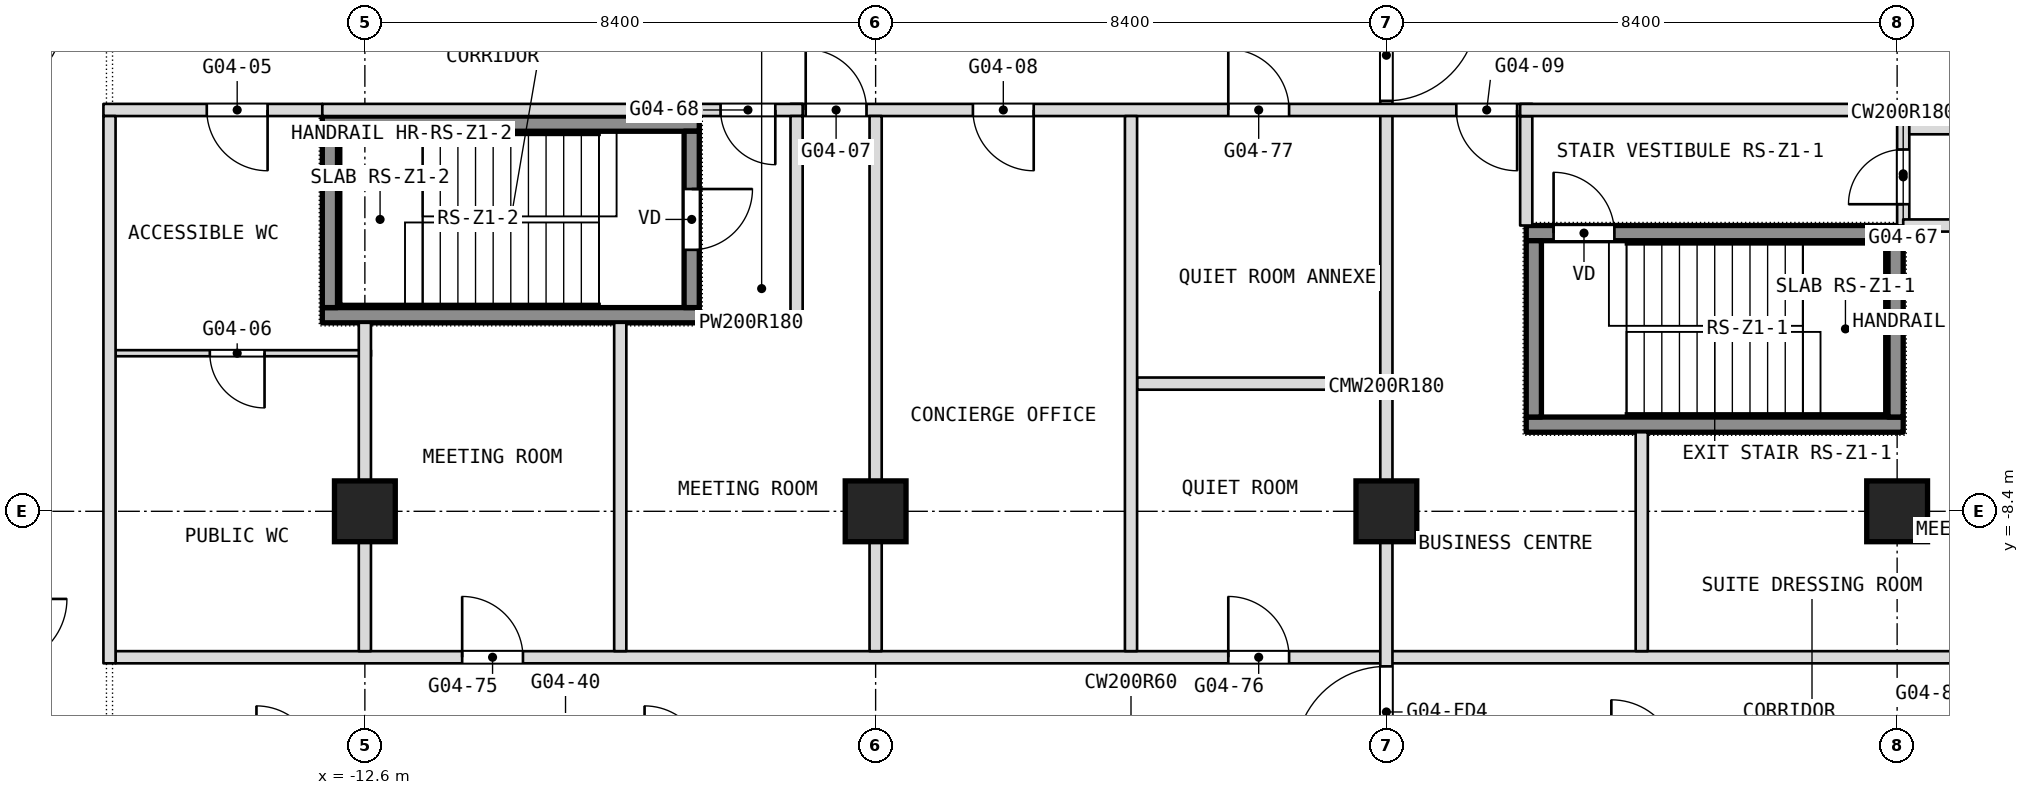
"""IFC4 building model, lengths in metres.
Left out: names, types, materials, properties, quantities, classifications, styles, units other than length and angle.
Written with IfcOpenShell. Run it as: python <this file> out.ifc"""

import sys

from ifc_helpers import new_model, si_unit, direction, frame, frame_2d, origin, origin_2d, place, context, subcontext, project, spatial, rectangle, extrude, element, fill, save


model = new_model("IFC4")
c1 = context("Model", 3, precision=1e-05, world=origin(), true_north=direction((0.0, 1.0)))
c2 = subcontext(c1, "Body", "Model", "MODEL_VIEW")
j1 = project(units=[si_unit("LENGTHUNIT", "METRE"), si_unit("PLANEANGLEUNIT", "RADIAN")], contexts=[c1])
p1 = place(None, origin())
s1 = spatial("IfcSite", under=j1, at=p1, CompositionType="ELEMENT")
p2 = place(p1, origin())
s2 = spatial("IfcBuilding", under=s1, at=p2, CompositionType="ELEMENT")
p3 = place(p2, frame((0.0, 0.0, 54.5)))
s3 = spatial("IfcBuildingStorey", under=s2, at=p3, CompositionType="ELEMENT", Elevation=54.5)
for number, where, z_axis, x_axis in (
    (1, (-12.6, -8.4, 0.0), (0.0, 0.0, 1.0), (1.0, 0.0, 0.0)),
    (2, (-4.2, -8.4, 0.0), (0.0, 0.0, 1.0), (1.0, 0.0, 0.0)),
    (3, (4.2, -8.4, 0.0), (0.0, 0.0, 1.0), (1.0, 0.0, 0.0)),
    (4, (12.6, -8.4, 0.0), (0.0, 0.0, 1.0), (1.0, 0.0, 0.0)),
):
    element("IfcColumn", number, at=place(p3, frame(where, z_axis=z_axis, x_axis=x_axis)), inside=s3, PredefinedType="COLUMN", context=c2, shape_type="SweptSolid", body=[
        extrude(rectangle(XDim=1.0, YDim=1.0, at=origin_2d()), origin(), (0.0, 0.0, 1.0), 3.6),
    ])
p4 = place(p3, frame((12.7, -3.7, 0.0), z_axis=(0.0, 0.0, 1.0), x_axis=(0.0, 1.0, 0.0)))
e5 = element("IfcWall", 5, at=p4, inside=s3, PredefinedType="PARTITIONING", context=c2, shape_type="SweptSolid", body=[
    extrude(rectangle(XDim=1.7, YDim=0.2, at=frame_2d((0.85, 0.0))), origin(), (0.0, 0.0, 1.0), 3.34),
])
p5 = place(p4, frame((0.35, 0.0, 0.0)))
e6 = element("IfcOpeningElement", 6, at=p5, cuts=e5, PredefinedType="OPENING", context=c2, shape_type="SweptSolid", body=[
    extrude(rectangle(XDim=0.9, YDim=2.1, at=frame_2d((0.45, 1.05))), frame((0.0, 0.1, 0.0), z_axis=(0.0, -1.0, 0.0), x_axis=(1.0, 0.0, 0.0)), (0.0, 0.0, 1.0), 0.2),
])
p6 = place(p3, frame((-16.7, -10.8, 0.0), z_axis=(0.0, 0.0, 1.0), x_axis=(1.0, 0.0, 0.0)))
e7 = element("IfcWall", 7, at=p6, inside=s3, PredefinedType="PARTITIONING", context=c2, shape_type="SweptSolid", body=[
    extrude(rectangle(XDim=33.4, YDim=0.2, at=frame_2d((16.7, 0.0))), origin(), (0.0, 0.0, 1.0), 3.34),
])
p7 = place(p6, frame((5.7, 0.0, 0.0)))
e8 = element("IfcOpeningElement", 8, at=p7, cuts=e7, PredefinedType="OPENING", context=c2, shape_type="SweptSolid", body=[
    extrude(rectangle(XDim=1.0, YDim=2.1, at=frame_2d((0.5, 1.05))), frame((0.0, 0.1, 0.0), z_axis=(0.0, -1.0, 0.0), x_axis=(1.0, 0.0, 0.0)), (0.0, 0.0, 1.0), 0.2),
])
p8 = place(p6, frame((18.3, 0.0, 0.0)))
e9 = element("IfcOpeningElement", 9, at=p8, cuts=e7, PredefinedType="OPENING", context=c2, shape_type="SweptSolid", body=[
    extrude(rectangle(XDim=1.0, YDim=2.1, at=frame_2d((0.5, 1.05))), frame((0.0, 0.1, 0.0), z_axis=(0.0, -1.0, 0.0), x_axis=(1.0, 0.0, 0.0)), (0.0, 0.0, 1.0), 0.2),
])
p9 = place(p3, frame((8.4, -10.7, 0.0), z_axis=(0.0, 0.0, 1.0), x_axis=(0.0, 1.0, 0.0)))
e10 = element("IfcWall", 10, at=p9, inside=s3, PredefinedType="PARTITIONING", context=c2, shape_type="SweptSolid", body=[
    extrude(rectangle(XDim=3.6, YDim=0.2, at=frame_2d((1.8, 0.0))), origin(), (0.0, 0.0, 1.0), 3.34),
])
p10 = place(p3, frame((6.5, -3.7, 0.0), z_axis=(0.0, 0.0, 1.0), x_axis=(0.0, 1.0, 0.0)))
e11 = element("IfcWall", 11, at=p10, inside=s3, PredefinedType="PARTITIONING", context=c2, shape_type="SweptSolid", body=[
    extrude(rectangle(XDim=1.8, YDim=0.2, at=frame_2d((0.9, 0.0))), origin(), (0.0, 0.0, 1.0), 3.34),
])
p11 = place(p3, frame((0.1, -6.3, 0.0), z_axis=(0.0, 0.0, 1.0), x_axis=(1.0, 0.0, 0.0)))
e12 = element("IfcWall", 12, at=p11, inside=s3, PredefinedType="PARTITIONING", context=c2, shape_type="SweptSolid", body=[
    extrude(rectangle(XDim=4.0, YDim=0.2, at=frame_2d((2.0, 0.0))), origin(), (0.0, 0.0, 1.0), 3.34),
])
p12 = place(p3, frame((-16.7, -5.8, 0.0), z_axis=(0.0, 0.0, 1.0), x_axis=(1.0, 0.0, 0.0)))
e13 = element("IfcWall", 13, at=p12, inside=s3, PredefinedType="PARTITIONING", context=c2, shape_type="SweptSolid", body=[
    extrude(rectangle(XDim=4.2, YDim=0.1, at=frame_2d((2.1, 0.0))), origin(), (0.0, 0.0, 1.0), 3.34),
])
p13 = place(p12, frame((1.55, 0.0, 0.0)))
e14 = element("IfcOpeningElement", 14, at=p13, cuts=e13, PredefinedType="OPENING", context=c2, shape_type="SweptSolid", body=[
    extrude(rectangle(XDim=0.9, YDim=2.1, at=frame_2d((0.45, 1.05))), frame((0.0, 0.05, 0.0), z_axis=(0.0, -1.0, 0.0), x_axis=(1.0, 0.0, 0.0)), (0.0, 0.0, 1.0), 0.1),
])
p14 = place(p3, frame((-7.1, -5.3, 0.0), z_axis=(0.0, 0.0, 1.0), x_axis=(1.0, 0.0, 0.0)))
e15 = element("IfcWall", 15, at=p14, inside=s3, PredefinedType="PARTITIONING", context=c2, shape_type="SweptSolid", body=[
    extrude(rectangle(XDim=1.7, YDim=0.2, at=frame_2d((0.85, 0.0))), origin(), (0.0, 0.0, 1.0), 3.34),
])
p15 = place(p3, frame((4.2, -12.7, 0.0), z_axis=(0.0, 0.0, 1.0), x_axis=(0.0, 1.0, 0.0)))
e16 = element("IfcWall", 16, at=p15, inside=s3, PredefinedType="PARTITIONING", context=c2, shape_type="SweptSolid", body=[
    extrude(rectangle(XDim=12.7, YDim=0.2, at=frame_2d((6.35, 0.0))), origin(), (0.0, 0.0, 1.0), 3.34),
])
p16 = place(p15, frame((11.05, 0.0, 0.0)))
e17 = element("IfcOpeningElement", 17, at=p16, cuts=e16, PredefinedType="OPENING", context=c2, shape_type="SweptSolid", body=[
    extrude(rectangle(XDim=1.5, YDim=2.1, at=frame_2d((0.75, 1.05))), frame((0.0, 0.1, 0.0), z_axis=(0.0, -1.0, 0.0), x_axis=(1.0, 0.0, 0.0)), (0.0, 0.0, 1.0), 0.2),
])
p17 = place(p15, frame((0.25, 0.0, 0.0)))
e18 = element("IfcOpeningElement", 18, at=p17, cuts=e16, PredefinedType="OPENING", context=c2, shape_type="SweptSolid", body=[
    extrude(rectangle(XDim=1.5, YDim=2.1, at=frame_2d((0.75, 1.05))), frame((0.0, 0.1, 0.0), z_axis=(0.0, -1.0, 0.0), x_axis=(1.0, 0.0, 0.0)), (0.0, 0.0, 1.0), 0.2),
])
p18 = place(p3, frame((12.7, -3.7, 0.0), z_axis=(0.0, 0.0, 1.0), x_axis=(1.0, 0.0, 0.0)))
e19 = element("IfcWall", 19, at=p18, inside=s3, PredefinedType="PARTITIONING", context=c2, shape_type="SweptSolid", body=[
    extrude(rectangle(XDim=4.0, YDim=0.2, at=frame_2d((2.0, 0.0))), origin(), (0.0, 0.0, 1.0), 3.34),
])
p19 = place(p3, frame((12.8, -2.1, 0.0), z_axis=(0.0, 0.0, 1.0), x_axis=(1.0, 0.0, 0.0)))
e20 = element("IfcWall", 20, at=p19, inside=s3, PredefinedType="PARTITIONING", context=c2, shape_type="SweptSolid", body=[
    extrude(rectangle(XDim=4.1, YDim=0.2, at=frame_2d((2.05, 0.0))), origin(), (0.0, 0.0, 1.0), 3.34),
])
p20 = place(p3, frame((-16.9, -1.8, 0.0), z_axis=(0.0, 0.0, 1.0), x_axis=(1.0, 0.0, 0.0)))
e21 = element("IfcWall", 21, at=p20, inside=s3, PredefinedType="PARTITIONING", context=c2, shape_type="SweptSolid", body=[
    extrude(rectangle(XDim=3.6, YDim=0.2, at=frame_2d((1.8, 0.0))), origin(), (0.0, 0.0, 1.0), 3.34),
])
p21 = place(p20, frame((1.7, 0.0, 0.0)))
e22 = element("IfcOpeningElement", 22, at=p21, cuts=e21, PredefinedType="OPENING", context=c2, shape_type="SweptSolid", body=[
    extrude(rectangle(XDim=1.0, YDim=2.1, at=frame_2d((0.5, 1.05))), frame((0.0, 0.1, 0.0), z_axis=(0.0, -1.0, 0.0), x_axis=(1.0, 0.0, 0.0)), (0.0, 0.0, 1.0), 0.2),
])
p22 = place(p3, frame((-5.6, -1.8, 0.0), z_axis=(0.0, 0.0, 1.0), x_axis=(1.0, 0.0, 0.0)))
e23 = element("IfcWall", 23, at=p22, inside=s3, PredefinedType="PARTITIONING", context=c2, shape_type="SweptSolid", body=[
    extrude(rectangle(XDim=12.2, YDim=0.2, at=frame_2d((6.1, 0.0))), origin(), (0.0, 0.0, 1.0), 3.34),
])
p23 = place(p22, frame((0.25, 0.0, 0.0)))
e24 = element("IfcOpeningElement", 24, at=p23, cuts=e23, PredefinedType="OPENING", context=c2, shape_type="SweptSolid", body=[
    extrude(rectangle(XDim=1.0, YDim=2.1, at=frame_2d((0.5, 1.05))), frame((0.0, 0.1, 0.0), z_axis=(0.0, -1.0, 0.0), x_axis=(1.0, 0.0, 0.0)), (0.0, 0.0, 1.0), 0.2),
])
p24 = place(p22, frame((3.0, 0.0, 0.0)))
e25 = element("IfcOpeningElement", 25, at=p24, cuts=e23, PredefinedType="OPENING", context=c2, shape_type="SweptSolid", body=[
    extrude(rectangle(XDim=1.0, YDim=2.1, at=frame_2d((0.5, 1.05))), frame((0.0, 0.1, 0.0), z_axis=(0.0, -1.0, 0.0), x_axis=(1.0, 0.0, 0.0)), (0.0, 0.0, 1.0), 0.2),
])
p25 = place(p22, frame((10.95, 0.0, 0.0)))
e26 = element("IfcOpeningElement", 26, at=p25, cuts=e23, PredefinedType="OPENING", context=c2, shape_type="SweptSolid", body=[
    extrude(rectangle(XDim=1.0, YDim=2.1, at=frame_2d((0.5, 1.05))), frame((0.0, 0.1, 0.0), z_axis=(0.0, -1.0, 0.0), x_axis=(1.0, 0.0, 0.0)), (0.0, 0.0, 1.0), 0.2),
])
p26 = place(p22, frame((7.2, 0.0, 0.0)))
e27 = element("IfcOpeningElement", 27, at=p26, cuts=e23, PredefinedType="OPENING", context=c2, shape_type="SweptSolid", body=[
    extrude(rectangle(XDim=1.0, YDim=2.1, at=frame_2d((0.5, 1.05))), frame((0.0, 0.1, 0.0), z_axis=(0.0, -1.0, 0.0), x_axis=(1.0, 0.0, 0.0)), (0.0, 0.0, 1.0), 0.2),
])
p27 = place(p3, frame((-13.3, -1.8, 0.0), z_axis=(0.0, 0.0, 1.0), x_axis=(1.0, 0.0, 0.0)))
e28 = element("IfcWall", 28, at=p27, inside=s3, PredefinedType="PARTITIONING", context=c2, shape_type="SweptSolid", body=[
    extrude(rectangle(XDim=7.9, YDim=0.2, at=frame_2d((3.95, 0.0))), origin(), (0.0, 0.0, 1.0), 3.34),
])
p28 = place(p27, frame((6.55, 0.0, 0.0)))
e29 = element("IfcOpeningElement", 29, at=p28, cuts=e28, PredefinedType="OPENING", context=c2, shape_type="SweptSolid", body=[
    extrude(rectangle(XDim=0.9, YDim=2.1, at=frame_2d((0.45, 1.05))), frame((0.0, 0.1, 0.0), z_axis=(0.0, -1.0, 0.0), x_axis=(1.0, 0.0, 0.0)), (0.0, 0.0, 1.0), 0.2),
])
p29 = place(p3, frame((6.4, -1.8, 0.0), z_axis=(0.0, 0.0, 1.0), x_axis=(1.0, 0.0, 0.0)))
e30 = element("IfcWall", 30, at=p29, inside=s3, PredefinedType="PARTITIONING", context=c2, shape_type="SweptSolid", body=[
    extrude(rectangle(XDim=10.5, YDim=0.2, at=frame_2d((5.25, 0.0))), origin(), (0.0, 0.0, 1.0), 3.34),
])
for number, where, z_axis, x_axis in (
    (31, (0.0, -10.7, 0.0), (0.0, 0.0, 1.0), (0.0, 1.0, 0.0)),
    (32, (-4.2, -10.7, 0.0), (0.0, 0.0, 1.0), (0.0, 1.0, 0.0)),
):
    element("IfcWall", number, at=place(p3, frame(where, z_axis=z_axis, x_axis=x_axis)), inside=s3, PredefinedType="PARTITIONING", context=c2, shape_type="SweptSolid", body=[
        extrude(rectangle(XDim=8.8, YDim=0.2, at=frame_2d((4.4, 0.0))), origin(), (0.0, 0.0, 1.0), 3.34),
    ])
p30 = place(p3, frame((-5.5, -5.2, 0.0), z_axis=(0.0, 0.0, 1.0), x_axis=(0.0, 1.0, 0.0)))
e33 = element("IfcWall", 33, at=p30, inside=s3, PredefinedType="PARTITIONING", context=c2, shape_type="SweptSolid", body=[
    extrude(rectangle(XDim=3.3, YDim=0.2, at=frame_2d((1.65, 0.0))), origin(), (0.0, 0.0, 1.0), 3.34),
])
for number, where, z_axis, x_axis in (
    (34, (-8.4, -10.7, 0.0), (0.0, 0.0, 1.0), (0.0, 1.0, 0.0)),
    (35, (-12.6, -10.7, 0.0), (0.0, 0.0, 1.0), (0.0, 1.0, 0.0)),
):
    element("IfcWall", number, at=place(p3, frame(where, z_axis=z_axis, x_axis=x_axis)), inside=s3, PredefinedType="PARTITIONING", context=c2, shape_type="SweptSolid", body=[
        extrude(rectangle(XDim=5.4, YDim=0.2, at=frame_2d((2.7, 0.0))), origin(), (0.0, 0.0, 1.0), 3.34),
    ])
p31 = place(p3, frame((-16.8, -10.9, 0.0), z_axis=(0.0, 0.0, 1.0), x_axis=(0.0, 1.0, 0.0)))
e36 = element("IfcWall", 36, at=p31, inside=s3, PredefinedType="PARTITIONING", context=c2, shape_type="SweptSolid", body=[
    extrude(rectangle(XDim=9.0, YDim=0.2, at=frame_2d((4.5, 0.0))), origin(), (0.0, 0.0, 1.0), 3.34),
])
p32 = place(p3, frame((6.5, -6.975, 0.1), z_axis=(0.0, 0.0, 1.0), x_axis=(1.0, 0.0, 0.0)))
e37 = element("IfcWall", 37, at=p32, inside=s3, PredefinedType="SHEAR", context=c2, shape_type="SweptSolid", body=[
    extrude(rectangle(XDim=6.2, YDim=0.25, at=frame_2d((3.1, 0.0))), origin(), (0.0, 0.0, 1.0), 3.6),
])
p33 = place(p3, frame((6.5, -3.825, 0.1), z_axis=(0.0, 0.0, 1.0), x_axis=(1.0, 0.0, 0.0)))
e38 = element("IfcWall", 38, at=p33, inside=s3, PredefinedType="SHEAR", context=c2, shape_type="SweptSolid", body=[
    extrude(rectangle(XDim=6.2, YDim=0.25, at=frame_2d((3.1, 0.0))), origin(), (0.0, 0.0, 1.0), 3.6),
])
p34 = place(p33, frame((0.45, 0.0, 0.0)))
e39 = element("IfcOpeningElement", 39, at=p34, cuts=e38, PredefinedType="OPENING", context=c2, shape_type="SweptSolid", body=[
    extrude(rectangle(XDim=1.0, YDim=2.1, at=frame_2d((0.5, 1.05))), frame((0.0, 0.125, 0.0), z_axis=(0.0, -1.0, 0.0), x_axis=(1.0, 0.0, 0.0)), (0.0, 0.0, 1.0), 0.25),
])
for number, where, z_axis, x_axis in (
    (40, (6.625, -6.85, 0.1), (0.0, 0.0, 1.0), (0.0, 1.0, 0.0)),
    (41, (12.575, -6.85, 0.1), (0.0, 0.0, 1.0), (0.0, 1.0, 0.0)),
):
    element("IfcWall", number, at=place(p3, frame(where, z_axis=z_axis, x_axis=x_axis)), inside=s3, PredefinedType="SHEAR", context=c2, shape_type="SweptSolid", body=[
        extrude(rectangle(XDim=2.9, YDim=0.25, at=frame_2d((1.45, 0.0))), origin(), (0.0, 0.0, 1.0), 3.6),
    ])
for number, where, z_axis, x_axis in (
    (42, (-13.3, -5.175, 0.1), (0.0, 0.0, 1.0), (1.0, 0.0, 0.0)),
    (43, (-13.3, -2.025, 0.1), (0.0, 0.0, 1.0), (1.0, 0.0, 0.0)),
):
    element("IfcWall", number, at=place(p3, frame(where, z_axis=z_axis, x_axis=x_axis)), inside=s3, PredefinedType="SHEAR", context=c2, shape_type="SweptSolid", body=[
        extrude(rectangle(XDim=6.2, YDim=0.25, at=frame_2d((3.1, 0.0))), origin(), (0.0, 0.0, 1.0), 3.6),
    ])
p35 = place(p3, frame((-13.175, -5.05, 0.1), z_axis=(0.0, 0.0, 1.0), x_axis=(0.0, 1.0, 0.0)))
e44 = element("IfcWall", 44, at=p35, inside=s3, PredefinedType="SHEAR", context=c2, shape_type="SweptSolid", body=[
    extrude(rectangle(XDim=2.9, YDim=0.25, at=frame_2d((1.45, 0.0))), origin(), (0.0, 0.0, 1.0), 3.6),
])
p36 = place(p3, frame((-7.225, -5.05, 0.1), z_axis=(0.0, 0.0, 1.0), x_axis=(0.0, 1.0, 0.0)))
e45 = element("IfcWall", 45, at=p36, inside=s3, PredefinedType="SHEAR", context=c2, shape_type="SweptSolid", body=[
    extrude(rectangle(XDim=2.9, YDim=0.25, at=frame_2d((1.45, 0.0))), origin(), (0.0, 0.0, 1.0), 3.6),
])
p37 = place(p36, frame((0.95, 0.0, 0.0)))
e46 = element("IfcOpeningElement", 46, at=p37, cuts=e45, PredefinedType="OPENING", context=c2, shape_type="SweptSolid", body=[
    extrude(rectangle(XDim=1.0, YDim=2.1, at=frame_2d((0.5, 1.05))), frame((0.0, 0.125, 0.0), z_axis=(0.0, -1.0, 0.0), x_axis=(1.0, 0.0, 0.0)), (0.0, 0.0, 1.0), 0.25),
])
p38 = place(p5, origin())
e47 = element("IfcDoor", 47, at=p38, inside=s3, OperationType="SINGLE_SWING_RIGHT", PredefinedType="DOOR", context=c2, shape_type="SweptSolid", body=[
    extrude(rectangle(XDim=0.9, YDim=2.1, at=frame_2d((0.45, 1.05))), frame((0.0, 0.025, 0.0), z_axis=(0.0, -1.0, 0.0), x_axis=(1.0, 0.0, 0.0)), (0.0, 0.0, 1.0), 0.05),
])
fill(e6, e47)
p39 = place(p7, origin())
e48 = element("IfcDoor", 48, at=p39, inside=s3, OperationType="SINGLE_SWING_LEFT", PredefinedType="DOOR", context=c2, shape_type="SweptSolid", body=[
    extrude(rectangle(XDim=1.0, YDim=2.1, at=frame_2d((0.5, 1.05))), frame((0.0, 0.025, 0.0), z_axis=(0.0, -1.0, 0.0), x_axis=(1.0, 0.0, 0.0)), (0.0, 0.0, 1.0), 0.05),
])
fill(e8, e48)
p40 = place(p8, origin())
e49 = element("IfcDoor", 49, at=p40, inside=s3, OperationType="SINGLE_SWING_RIGHT", PredefinedType="DOOR", context=c2, shape_type="SweptSolid", body=[
    extrude(rectangle(XDim=1.0, YDim=2.1, at=frame_2d((0.5, 1.05))), frame((0.0, 0.025, 0.0), z_axis=(0.0, -1.0, 0.0), x_axis=(1.0, 0.0, 0.0)), (0.0, 0.0, 1.0), 0.05),
])
fill(e9, e49)
p41 = place(p13, origin())
e50 = element("IfcDoor", 50, at=p41, inside=s3, OperationType="SINGLE_SWING_RIGHT", PredefinedType="DOOR", context=c2, shape_type="SweptSolid", body=[
    extrude(rectangle(XDim=0.9, YDim=2.1, at=frame_2d((0.45, 1.05))), frame((0.0, 0.025, 0.0), z_axis=(0.0, -1.0, 0.0), x_axis=(1.0, 0.0, 0.0)), (0.0, 0.0, 1.0), 0.05),
])
fill(e14, e50)
p42 = place(p21, origin())
e51 = element("IfcDoor", 51, at=p42, inside=s3, OperationType="SINGLE_SWING_RIGHT", PredefinedType="DOOR", context=c2, shape_type="SweptSolid", body=[
    extrude(rectangle(XDim=1.0, YDim=2.1, at=frame_2d((0.5, 1.05))), frame((0.0, 0.025, 0.0), z_axis=(0.0, -1.0, 0.0), x_axis=(1.0, 0.0, 0.0)), (0.0, 0.0, 1.0), 0.05),
])
fill(e22, e51)
p43 = place(p23, origin())
e52 = element("IfcDoor", 52, at=p43, inside=s3, OperationType="SINGLE_SWING_RIGHT", PredefinedType="DOOR", context=c2, shape_type="SweptSolid", body=[
    extrude(rectangle(XDim=1.0, YDim=2.1, at=frame_2d((0.5, 1.05))), frame((0.0, 0.025, 0.0), z_axis=(0.0, -1.0, 0.0), x_axis=(1.0, 0.0, 0.0)), (0.0, 0.0, 1.0), 0.05),
])
fill(e24, e52)
p44 = place(p24, origin())
e53 = element("IfcDoor", 53, at=p44, inside=s3, OperationType="SINGLE_SWING_LEFT", PredefinedType="DOOR", context=c2, shape_type="SweptSolid", body=[
    extrude(rectangle(XDim=1.0, YDim=2.1, at=frame_2d((0.5, 1.05))), frame((0.0, 0.025, 0.0), z_axis=(0.0, -1.0, 0.0), x_axis=(1.0, 0.0, 0.0)), (0.0, 0.0, 1.0), 0.05),
])
fill(e25, e53)
p45 = place(p25, origin())
e54 = element("IfcDoor", 54, at=p45, inside=s3, OperationType="SINGLE_SWING_RIGHT", PredefinedType="DOOR", context=c2, shape_type="SweptSolid", body=[
    extrude(rectangle(XDim=1.0, YDim=2.1, at=frame_2d((0.5, 1.05))), frame((0.0, 0.025, 0.0), z_axis=(0.0, -1.0, 0.0), x_axis=(1.0, 0.0, 0.0)), (0.0, 0.0, 1.0), 0.05),
])
fill(e26, e54)
p46 = place(p26, origin())
e55 = element("IfcDoor", 55, at=p46, inside=s3, OperationType="SINGLE_SWING_RIGHT", PredefinedType="DOOR", context=c2, shape_type="SweptSolid", body=[
    extrude(rectangle(XDim=1.0, YDim=2.1, at=frame_2d((0.5, 1.05))), frame((0.0, 0.025, 0.0), z_axis=(0.0, -1.0, 0.0), x_axis=(1.0, 0.0, 0.0)), (0.0, 0.0, 1.0), 0.05),
])
fill(e27, e55)
p47 = place(p28, origin())
e56 = element("IfcDoor", 56, at=p47, inside=s3, OperationType="SINGLE_SWING_LEFT", PredefinedType="DOOR", context=c2, shape_type="SweptSolid", body=[
    extrude(rectangle(XDim=0.9, YDim=2.1, at=frame_2d((0.45, 1.05))), frame((0.0, 0.025, 0.0), z_axis=(0.0, -1.0, 0.0), x_axis=(1.0, 0.0, 0.0)), (0.0, 0.0, 1.0), 0.05),
])
fill(e29, e56)
p48 = place(p34, origin())
e57 = element("IfcDoor", 57, at=p48, inside=s3, OperationType="SINGLE_SWING_LEFT", PredefinedType="DOOR", context=c2, shape_type="SweptSolid", body=[
    extrude(rectangle(XDim=1.0, YDim=2.1, at=frame_2d((0.5, 1.05))), frame((0.0, 0.025, 0.0), z_axis=(0.0, -1.0, 0.0), x_axis=(1.0, 0.0, 0.0)), (0.0, 0.0, 1.0), 0.05),
])
fill(e39, e57)
p49 = place(p37, origin())
e58 = element("IfcDoor", 58, at=p49, inside=s3, OperationType="SINGLE_SWING_LEFT", PredefinedType="DOOR", context=c2, shape_type="SweptSolid", body=[
    extrude(rectangle(XDim=1.0, YDim=2.1, at=frame_2d((0.5, 1.05))), frame((0.0, 0.025, 0.0), z_axis=(0.0, -1.0, 0.0), x_axis=(1.0, 0.0, 0.0)), (0.0, 0.0, 1.0), 0.05),
])
fill(e46, e58)
p50 = place(p16, origin())
e59 = element("IfcDoor", 59, at=p50, inside=s3, OperationType="DOUBLE_DOOR_DOUBLE_SWING", PredefinedType="DOOR", context=c2, shape_type="SweptSolid", body=[
    extrude(rectangle(XDim=1.5, YDim=2.1, at=frame_2d((0.75, 1.05))), frame((0.0, 0.025, 0.0), z_axis=(0.0, -1.0, 0.0), x_axis=(1.0, 0.0, 0.0)), (0.0, 0.0, 1.0), 0.05),
])
fill(e17, e59)
p51 = place(p17, origin())
e60 = element("IfcDoor", 60, at=p51, inside=s3, OperationType="DOUBLE_DOOR_DOUBLE_SWING", PredefinedType="DOOR", context=c2, shape_type="SweptSolid", body=[
    extrude(rectangle(XDim=1.5, YDim=2.1, at=frame_2d((0.75, 1.05))), frame((0.0, 0.025, 0.0), z_axis=(0.0, -1.0, 0.0), x_axis=(1.0, 0.0, 0.0)), (0.0, 0.0, 1.0), 0.05),
])
fill(e18, e60)
save(model, sys.argv[1])
